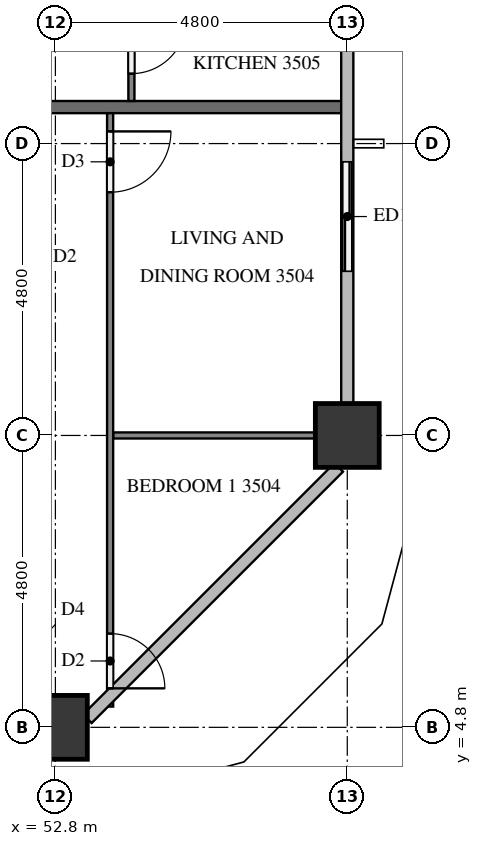
"""IFC4 building model, lengths in metres.
Left out: names, types, materials, properties, quantities, classifications, styles, units other than length and angle.
Written with IfcOpenShell. Run it as: python <this file> out.ifc"""

import sys

from ifc_helpers import new_model, si_unit, direction, frame, frame_2d, origin, origin_2d, place, context, subcontext, project, spatial, rectangle, extrude, element, fill, save


model = new_model("IFC4")
c1 = context("Model", 3, precision=1e-05, world=origin(), true_north=direction((0.0, 1.0)))
c2 = subcontext(c1, "Body", "Model", "MODEL_VIEW")
j1 = project(units=[si_unit("LENGTHUNIT", "METRE"), si_unit("PLANEANGLEUNIT", "RADIAN")], contexts=[c1])
p1 = place(None, origin())
s1 = spatial("IfcSite", under=j1, at=p1, CompositionType="ELEMENT")
p2 = place(p1, origin())
s2 = spatial("IfcBuilding", under=s1, at=p2, CompositionType="ELEMENT")
p3 = place(p2, frame((0.0, 0.0, 136.6)))
s3 = spatial("IfcBuildingStorey", under=s2, at=p3, CompositionType="ELEMENT", Elevation=136.6)
for number, where, z_axis, x_axis in (
    (1, (52.8, 4.8, 0.0), (0.0, 0.0, 1.0), (1.0, 0.0, 0.0)),
    (2, (57.6, 9.6, 0.0), (0.0, 0.0, 1.0), (1.0, 0.0, 0.0)),
):
    element("IfcColumn", number, at=place(p3, frame(where, z_axis=z_axis, x_axis=x_axis)), inside=s3, PredefinedType="COLUMN", context=c2, shape_type="SweptSolid", body=[
        extrude(rectangle(XDim=1.05, YDim=1.05, at=origin_2d()), origin(), (0.0, 0.0, 1.0), 3.2),
    ])
p4 = place(p3, frame((57.6, 12.0, 0.0), z_axis=(0.0, 0.0, 1.0), x_axis=(0.0, 1.0, 0.0)))
e3 = element("IfcWall", 3, at=p4, inside=s3, PredefinedType="SOLIDWALL", context=c2, shape_type="SweptSolid", body=[
    extrude(rectangle(XDim=2.4, YDim=0.15, at=frame_2d((1.2, 0.0))), origin(), (0.0, 0.0, 1.0), 3.2),
])
p5 = place(p4, frame((0.3, 0.0, 0.0)))
e4 = element("IfcOpeningElement", 4, at=p5, cuts=e3, PredefinedType="OPENING", context=c2, shape_type="SweptSolid", body=[
    extrude(rectangle(XDim=1.8, YDim=2.4, at=frame_2d((0.9, 1.2))), frame((0.0, 0.085, 0.0), z_axis=(0.0, -1.0, 0.0), x_axis=(1.0, 0.0, 0.0)), (0.0, 0.0, 1.0), 0.17),
])
p6 = place(p3, frame((52.5, 15.0, 0.0), z_axis=(0.0, 0.0, 1.0), x_axis=(1.0, 0.0, 0.0)))
e5 = element("IfcWall", 5, at=p6, inside=s3, PredefinedType="PARTITIONING", context=c2, shape_type="SweptSolid", body=[
    extrude(rectangle(XDim=5.0, YDim=0.2, at=frame_2d((2.5, 0.0))), origin(), (0.0, 0.0, 1.0), 3.2),
])
p7 = place(p3, frame((53.75, 9.6, 0.0), z_axis=(0.0, 0.0, 1.0), x_axis=(1.0, 0.0, 0.0)))
e6 = element("IfcWall", 6, at=p7, inside=s3, PredefinedType="PARTITIONING", context=c2, shape_type="SweptSolid", body=[
    extrude(rectangle(XDim=3.325, YDim=0.1, at=frame_2d((1.663, 0.0))), origin(), (0.0, 0.0, 1.0), 3.2),
])
p8 = place(p3, frame((53.7, 14.9, 0.0), z_axis=(0.0, 0.0, 1.0), x_axis=(0.0, -1.0, 0.0)))
e7 = element("IfcWall", 7, at=p8, inside=s3, PredefinedType="PARTITIONING", context=c2, shape_type="SweptSolid", body=[
    extrude(rectangle(XDim=9.759, YDim=0.1, at=frame_2d((4.879, 0.0))), origin(), (0.0, 0.0, 1.0), 3.2),
])
p9 = place(p8, frame((0.3, 0.0, 0.0)))
e8 = element("IfcOpeningElement", 8, at=p9, cuts=e7, PredefinedType="OPENING", context=c2, shape_type="SweptSolid", body=[
    extrude(rectangle(XDim=1.0, YDim=2.1, at=frame_2d((0.5, 1.05))), frame((0.0, 0.06, 0.0), z_axis=(0.0, -1.0, 0.0), x_axis=(1.0, 0.0, 0.0)), (0.0, 0.0, 1.0), 0.12),
])
p10 = place(p8, frame((8.559, 0.0, 0.0)))
e9 = element("IfcOpeningElement", 9, at=p10, cuts=e7, PredefinedType="OPENING", context=c2, shape_type="SweptSolid", body=[
    extrude(rectangle(XDim=0.9, YDim=2.1, at=frame_2d((0.45, 1.05))), frame((0.0, 0.06, 0.0), z_axis=(0.0, -1.0, 0.0), x_axis=(1.0, 0.0, 0.0)), (0.0, 0.0, 1.0), 0.12),
])
p11 = place(p3, frame((54.05, 37.7, 0.0), z_axis=(0.0, 0.0, 1.0), x_axis=(0.0, -1.0, 0.0)))
e10 = element("IfcWall", 10, at=p11, inside=s3, PredefinedType="PARTITIONING", context=c2, shape_type="SweptSolid", body=[
    extrude(rectangle(XDim=22.6, YDim=0.1, at=frame_2d((11.3, 0.0))), origin(), (0.0, 0.0, 1.0), 3.2),
])
p12 = place(p11, frame((2.85, 0.0, 0.0)))
e11 = element("IfcOpeningElement", 11, at=p12, cuts=e10, PredefinedType="OPENING", context=c2, shape_type="SweptSolid", body=[
    extrude(rectangle(XDim=0.9, YDim=2.1, at=frame_2d((0.45, 1.05))), frame((0.0, 0.06, 0.0), z_axis=(0.0, -1.0, 0.0), x_axis=(1.0, 0.0, 0.0)), (0.0, 0.0, 1.0), 0.12),
])
p13 = place(p11, frame((4.45, 0.0, 0.0)))
e12 = element("IfcOpeningElement", 12, at=p13, cuts=e10, PredefinedType="OPENING", context=c2, shape_type="SweptSolid", body=[
    extrude(rectangle(XDim=0.8, YDim=2.1, at=frame_2d((0.4, 1.05))), frame((0.0, 0.06, 0.0), z_axis=(0.0, -1.0, 0.0), x_axis=(1.0, 0.0, 0.0)), (0.0, 0.0, 1.0), 0.12),
])
p14 = place(p11, frame((10.05, 0.0, 0.0)))
e13 = element("IfcOpeningElement", 13, at=p14, cuts=e10, PredefinedType="OPENING", context=c2, shape_type="SweptSolid", body=[
    extrude(rectangle(XDim=0.9, YDim=2.1, at=frame_2d((0.45, 1.05))), frame((0.0, 0.06, 0.0), z_axis=(0.0, -1.0, 0.0), x_axis=(1.0, 0.0, 0.0)), (0.0, 0.0, 1.0), 0.12),
])
p15 = place(p11, frame((11.65, 0.0, 0.0)))
e14 = element("IfcOpeningElement", 14, at=p15, cuts=e10, PredefinedType="OPENING", context=c2, shape_type="SweptSolid", body=[
    extrude(rectangle(XDim=0.9, YDim=2.1, at=frame_2d((0.45, 1.05))), frame((0.0, 0.06, 0.0), z_axis=(0.0, -1.0, 0.0), x_axis=(1.0, 0.0, 0.0)), (0.0, 0.0, 1.0), 0.12),
])
p16 = place(p11, frame((19.55, 0.0, 0.0)))
e15 = element("IfcOpeningElement", 15, at=p16, cuts=e10, PredefinedType="OPENING", context=c2, shape_type="SweptSolid", body=[
    extrude(rectangle(XDim=1.0, YDim=2.1, at=frame_2d((0.5, 1.05))), frame((0.0, 0.06, 0.0), z_axis=(0.0, -1.0, 0.0), x_axis=(1.0, 0.0, 0.0)), (0.0, 0.0, 1.0), 0.12),
])
p17 = place(p11, frame((21.25, 0.0, 0.0)))
e16 = element("IfcOpeningElement", 16, at=p17, cuts=e10, PredefinedType="OPENING", context=c2, shape_type="SweptSolid", body=[
    extrude(rectangle(XDim=0.9, YDim=2.1, at=frame_2d((0.45, 1.05))), frame((0.0, 0.06, 0.0), z_axis=(0.0, -1.0, 0.0), x_axis=(1.0, 0.0, 0.0)), (0.0, 0.0, 1.0), 0.12),
])
p18 = place(p5, origin())
e17 = element("IfcDoor", 17, at=p18, inside=s3, OperationType="SLIDING_TO_RIGHT", PredefinedType="DOOR", context=c2, shape_type="SweptSolid", body=[
    extrude(rectangle(XDim=1.8, YDim=2.4, at=frame_2d((0.9, 1.2))), frame((0.0, 0.025, 0.0), z_axis=(0.0, -1.0, 0.0), x_axis=(1.0, 0.0, 0.0)), (0.0, 0.0, 1.0), 0.05),
])
fill(e4, e17)
p19 = place(p9, origin())
e18 = element("IfcDoor", 18, at=p19, inside=s3, OperationType="SINGLE_SWING_LEFT", PredefinedType="DOOR", context=c2, shape_type="SweptSolid", body=[
    extrude(rectangle(XDim=1.0, YDim=2.1, at=frame_2d((0.5, 1.05))), frame((0.0, 0.025, 0.0), z_axis=(0.0, -1.0, 0.0), x_axis=(1.0, 0.0, 0.0)), (0.0, 0.0, 1.0), 0.05),
])
fill(e8, e18)
p20 = place(p10, origin())
e19 = element("IfcDoor", 19, at=p20, inside=s3, OperationType="SINGLE_SWING_RIGHT", PredefinedType="DOOR", context=c2, shape_type="SweptSolid", body=[
    extrude(rectangle(XDim=0.9, YDim=2.1, at=frame_2d((0.45, 1.05))), frame((0.0, 0.025, 0.0), z_axis=(0.0, -1.0, 0.0), x_axis=(1.0, 0.0, 0.0)), (0.0, 0.0, 1.0), 0.05),
])
fill(e9, e19)
p21 = place(p17, origin())
e20 = element("IfcDoor", 20, at=p21, inside=s3, OperationType="SINGLE_SWING_LEFT", PredefinedType="DOOR", context=c2, shape_type="SweptSolid", body=[
    extrude(rectangle(XDim=0.9, YDim=2.1, at=frame_2d((0.45, 1.05))), frame((0.0, 0.025, 0.0), z_axis=(0.0, -1.0, 0.0), x_axis=(1.0, 0.0, 0.0)), (0.0, 0.0, 1.0), 0.05),
])
fill(e16, e20)
save(model, sys.argv[1])
